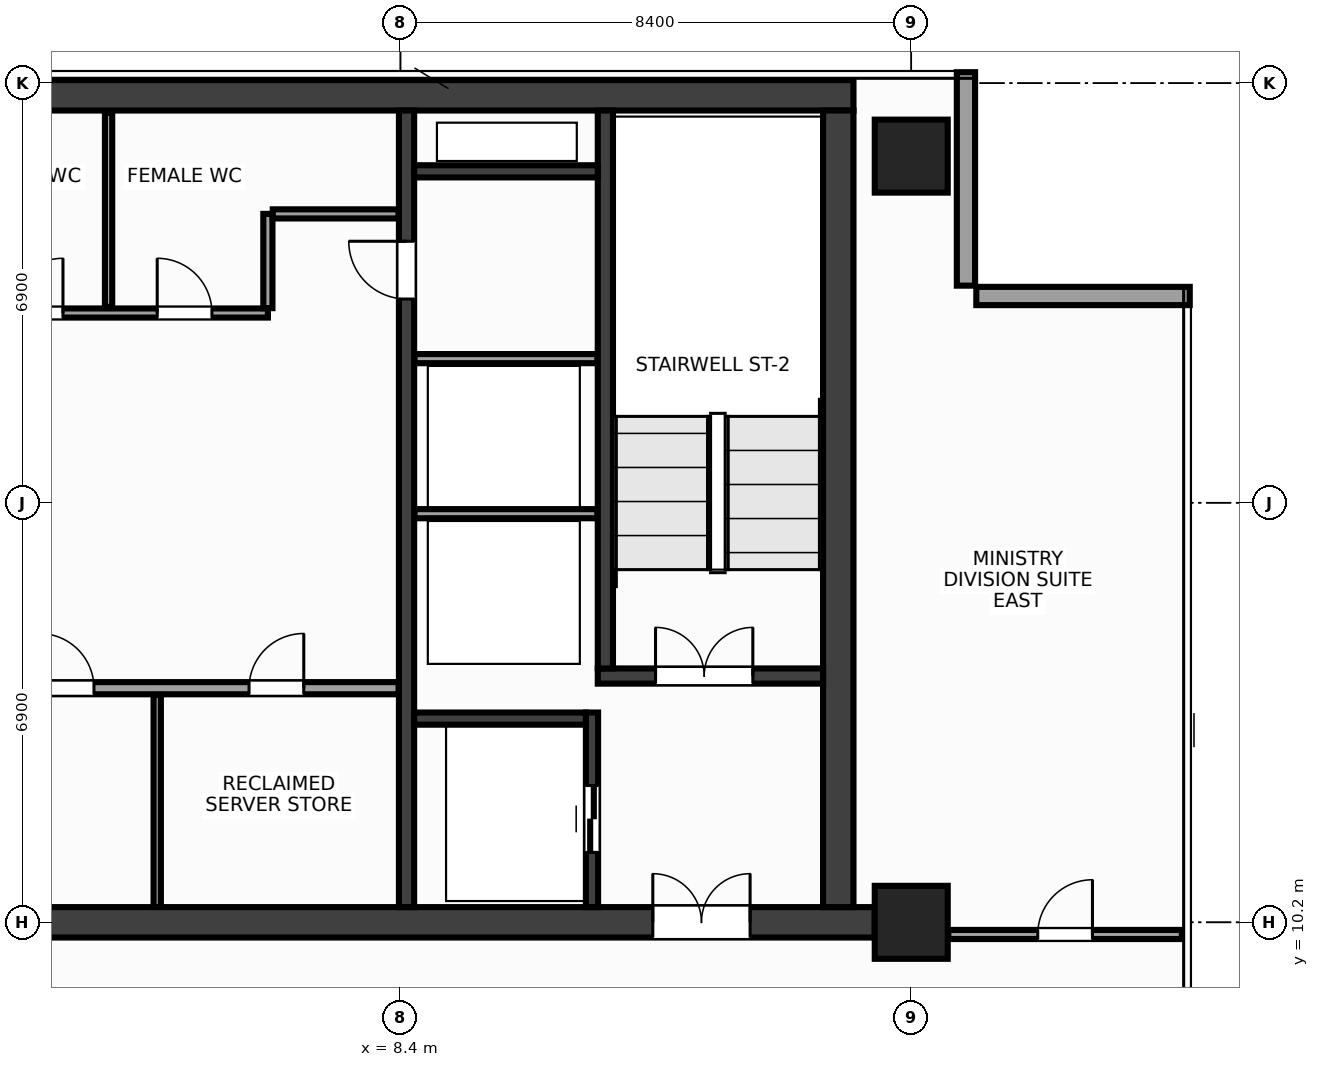
"""IFC4 building model, lengths in metres.
Left out: names, types, materials, properties, quantities, classifications, styles, units other than length and angle.
Written with IfcOpenShell. Run it as: python <this file> out.ifc"""

import sys

from ifc_helpers import new_model, si_unit, direction, frame, frame_2d, origin, origin_2d, place, context, subcontext, project, spatial, rectangle, extrude, source, transform, mapped, element, fill, save


model = new_model("IFC4")
c1 = context("Model", 3, precision=1e-05, world=origin(), true_north=direction((0.0, 1.0)))
c2 = subcontext(c1, "Body", "Model", "MODEL_VIEW")
j1 = project(units=[si_unit("LENGTHUNIT", "METRE"), si_unit("PLANEANGLEUNIT", "RADIAN")], contexts=[c1])
p1 = place(None, origin())
s1 = spatial("IfcSite", under=j1, at=p1, CompositionType="ELEMENT")
p2 = place(p1, origin())
s2 = spatial("IfcBuilding", under=s1, at=p2, CompositionType="ELEMENT")
p3 = place(p2, frame((0.0, 0.0, 279.2)))
s3 = spatial("IfcBuildingStorey", under=s2, at=p3, CompositionType="ELEMENT", Elevation=279.2)
m1 = source(origin(), c2, "Body", "SweptSolid", [
    extrude(rectangle(XDim=31.7, YDim=0.5, at=frame_2d((15.85, 0.0))), origin(), (0.0, 0.0, 1.0), 3.6),
])
p4 = place(p3, frame((-15.85, 23.8, 0.0), z_axis=(0.0, 0.0, 1.0), x_axis=(1.0, 0.0, 0.0)))
e1 = element("IfcWall", 1, at=p4, inside=s3, PredefinedType="SHEAR", context=c2, shape_type="MappedRepresentation", body=[
    mapped(m1, transform((0.0, 0.0, 0.0), x_axis=(1.0, 0.0, 0.0), y_axis=(0.0, 1.0, 0.0), z_axis=(0.0, 0.0, 1.0), scale=1.0)),
])
m2 = source(origin(), c2, "Body", "SweptSolid", [
    extrude(rectangle(XDim=32.4, YDim=0.5, at=frame_2d((16.2, 0.0))), origin(), (0.0, 0.0, 1.0), 3.6),
])
p5 = place(p3, frame((-16.2, 10.2, 0.0), z_axis=(0.0, 0.0, 1.0), x_axis=(1.0, 0.0, 0.0)))
e2 = element("IfcWall", 2, at=p5, inside=s3, PredefinedType="SHEAR", context=c2, shape_type="MappedRepresentation", body=[
    mapped(m2, transform((0.0, 0.0, 0.0), x_axis=(1.0, 0.0, 0.0), y_axis=(0.0, 1.0, 0.0), z_axis=(0.0, 0.0, 1.0), scale=1.0)),
])
p6 = place(p5, frame((2.05, 0.0, 0.0)))
e3 = element("IfcOpeningElement", 3, at=p6, cuts=e2, PredefinedType="OPENING", context=c2, shape_type="SweptSolid", body=[
    extrude(rectangle(XDim=1.6, YDim=2.15, at=frame_2d((0.8, 1.075))), frame((0.0, 0.262, 0.0), z_axis=(0.0, -1.0, 0.0), x_axis=(1.0, 0.0, 0.0)), (0.0, 0.0, 1.0), 0.524),
])
p7 = place(p5, frame((28.75, 0.0, 0.0)))
e4 = element("IfcOpeningElement", 4, at=p7, cuts=e2, PredefinedType="OPENING", context=c2, shape_type="SweptSolid", body=[
    extrude(rectangle(XDim=1.6, YDim=2.15, at=frame_2d((0.8, 1.075))), frame((0.0, 0.262, 0.0), z_axis=(0.0, -1.0, 0.0), x_axis=(1.0, 0.0, 0.0)), (0.0, 0.0, 1.0), 0.524),
])
p8 = place(p5, frame((15.45, 0.0, 0.0)))
e5 = element("IfcOpeningElement", 5, at=p8, cuts=e2, PredefinedType="OPENING", context=c2, shape_type="SweptSolid", body=[
    extrude(rectangle(XDim=1.5, YDim=2.2, at=frame_2d((0.75, 1.1))), frame((0.0, 0.262, 0.0), z_axis=(0.0, -1.0, 0.0), x_axis=(1.0, 0.0, 0.0)), (0.0, 0.0, 1.0), 0.524),
])
m3 = source(origin(), c2, "Body", "SweptSolid", [
    extrude(rectangle(XDim=13.1, YDim=0.5, at=frame_2d((6.55, 0.0))), origin(), (0.0, 0.0, 1.0), 3.6),
])
p9 = place(p3, frame((15.6, 10.45, 0.0), z_axis=(0.0, 0.0, 1.0), x_axis=(0.0, 1.0, 0.0)))
e6 = element("IfcWall", 6, at=p9, inside=s3, PredefinedType="SHEAR", context=c2, shape_type="MappedRepresentation", body=[
    mapped(m3, transform((0.0, 0.0, 0.0), x_axis=(1.0, 0.0, 0.0), y_axis=(0.0, 1.0, 0.0), z_axis=(0.0, 0.0, 1.0), scale=1.0)),
])
m4 = source(origin(), c2, "Body", "SweptSolid", [
    extrude(rectangle(XDim=13.1, YDim=0.25, at=frame_2d((6.55, 0.0))), origin(), (0.0, 0.0, 1.0), 3.6),
])
p10 = place(p3, frame((8.5, 10.45, 0.0), z_axis=(0.0, 0.0, 1.0), x_axis=(0.0, 1.0, 0.0)))
e7 = element("IfcWall", 7, at=p10, inside=s3, PredefinedType="SHEAR", context=c2, shape_type="MappedRepresentation", body=[
    mapped(m4, transform((0.0, 0.0, 0.0), x_axis=(1.0, 0.0, 0.0), y_axis=(0.0, 1.0, 0.0), z_axis=(0.0, 0.0, 1.0), scale=1.0)),
])
p11 = place(p10, frame((10.0, 0.0, 0.0)))
e8 = element("IfcOpeningElement", 8, at=p11, cuts=e7, PredefinedType="OPENING", context=c2, shape_type="SweptSolid", body=[
    extrude(rectangle(XDim=0.95, YDim=2.15, at=frame_2d((0.475, 1.075))), frame((0.0, 0.137, 0.0), z_axis=(0.0, -1.0, 0.0), x_axis=(1.0, 0.0, 0.0)), (0.0, 0.0, 1.0), 0.274),
])
m5 = source(origin(), c2, "Body", "SweptSolid", [
    extrude(rectangle(XDim=3.705, YDim=0.25, at=frame_2d((1.853, 0.0))), origin(), (0.0, 0.0, 1.0), 3.6),
])
p12 = place(p3, frame((11.645, 14.25, 0.0), z_axis=(0.0, 0.0, 1.0), x_axis=(1.0, 0.0, 0.0)))
e9 = element("IfcWall", 9, at=p12, inside=s3, PredefinedType="SHEAR", context=c2, shape_type="MappedRepresentation", body=[
    mapped(m5, transform((0.0, 0.0, 0.0), x_axis=(1.0, 0.0, 0.0), y_axis=(0.0, 1.0, 0.0), z_axis=(0.0, 0.0, 1.0), scale=1.0)),
])
p13 = place(p12, frame((0.95, 0.0, 0.0)))
e10 = element("IfcOpeningElement", 10, at=p13, cuts=e9, PredefinedType="OPENING", context=c2, shape_type="SweptSolid", body=[
    extrude(rectangle(XDim=1.6, YDim=2.15, at=frame_2d((0.8, 1.075))), frame((0.0, 0.137, 0.0), z_axis=(0.0, -1.0, 0.0), x_axis=(1.0, 0.0, 0.0)), (0.0, 0.0, 1.0), 0.274),
])
m6 = source(origin(), c2, "Body", "SweptSolid", [
    extrude(rectangle(XDim=9.175, YDim=0.25, at=frame_2d((4.587, 0.0))), origin(), (0.0, 0.0, 1.0), 3.6),
])
p14 = place(p3, frame((11.77, 14.375, 0.0), z_axis=(0.0, 0.0, 1.0), x_axis=(0.0, 1.0, 0.0)))
e11 = element("IfcWall", 11, at=p14, inside=s3, PredefinedType="SHEAR", context=c2, shape_type="MappedRepresentation", body=[
    mapped(m6, transform((0.0, 0.0, 0.0), x_axis=(1.0, 0.0, 0.0), y_axis=(0.0, 1.0, 0.0), z_axis=(0.0, 0.0, 1.0), scale=1.0)),
])
m7 = source(origin(), c2, "Body", "SweptSolid", [
    extrude(rectangle(XDim=3.2, YDim=0.2, at=frame_2d((1.6, 0.0))), origin(), (0.0, 0.0, 1.0), 3.6),
])
p15 = place(p3, frame((11.55, 10.45, 0.0), z_axis=(0.0, 0.0, 1.0), x_axis=(0.0, 1.0, 0.0)))
e12 = element("IfcWall", 12, at=p15, inside=s3, PredefinedType="SHEAR", context=c2, shape_type="MappedRepresentation", body=[
    mapped(m7, transform((0.0, 0.0, 0.0), x_axis=(1.0, 0.0, 0.0), y_axis=(0.0, 1.0, 0.0), z_axis=(0.0, 0.0, 1.0), scale=1.0)),
])
p16 = place(p15, frame((0.9, 0.0, 0.0)))
e13 = element("IfcOpeningElement", 13, at=p16, cuts=e12, PredefinedType="OPENING", context=c2, shape_type="SweptSolid", body=[
    extrude(rectangle(XDim=1.1, YDim=2.15, at=frame_2d((0.55, 1.075))), frame((0.0, 0.112, 0.0), z_axis=(0.0, -1.0, 0.0), x_axis=(1.0, 0.0, 0.0)), (0.0, 0.0, 1.0), 0.224),
])
m8 = source(origin(), c2, "Body", "SweptSolid", [
    extrude(rectangle(XDim=2.825, YDim=0.2, at=frame_2d((1.413, 0.0))), origin(), (0.0, 0.0, 1.0), 3.6),
])
p17 = place(p3, frame((8.625, 13.55, 0.0), z_axis=(0.0, 0.0, 1.0), x_axis=(1.0, 0.0, 0.0)))
e14 = element("IfcWall", 14, at=p17, inside=s3, PredefinedType="SHEAR", context=c2, shape_type="MappedRepresentation", body=[
    mapped(m8, transform((0.0, 0.0, 0.0), x_axis=(1.0, 0.0, 0.0), y_axis=(0.0, 1.0, 0.0), z_axis=(0.0, 0.0, 1.0), scale=1.0)),
])
m9 = source(origin(), c2, "Body", "SweptSolid", [
    extrude(rectangle(XDim=3.02, YDim=0.2, at=frame_2d((1.51, 0.0))), origin(), (0.0, 0.0, 1.0), 3.6),
])
p18 = place(p3, frame((8.625, 22.55, 0.0), z_axis=(0.0, 0.0, 1.0), x_axis=(1.0, 0.0, 0.0)))
e15 = element("IfcWall", 15, at=p18, inside=s3, PredefinedType="SHEAR", context=c2, shape_type="MappedRepresentation", body=[
    mapped(m9, transform((0.0, 0.0, 0.0), x_axis=(1.0, 0.0, 0.0), y_axis=(0.0, 1.0, 0.0), z_axis=(0.0, 0.0, 1.0), scale=1.0)),
])
m10 = source(origin(), c2, "Body", "SweptSolid", [
    extrude(rectangle(XDim=1.2, YDim=1.2, at=origin_2d()), origin(), (0.0, 0.0, 1.0), 3.6),
])
for number, where, z_axis, x_axis in (
    (16, (16.8, 10.2, 0.0), (0.0, 0.0, 1.0), (1.0, 0.0, 0.0)),
    (17, (16.8, 22.8, 0.0), (0.0, 0.0, 1.0), (1.0, 0.0, 0.0)),
):
    element("IfcColumn", number, at=place(p3, frame(where, z_axis=z_axis, x_axis=x_axis)), inside=s3, PredefinedType="COLUMN", context=c2, shape_type="MappedRepresentation", body=[
        mapped(m10, transform((0.0, 0.0, 0.0), x_axis=(1.0, 0.0, 0.0), y_axis=(0.0, 1.0, 0.0), z_axis=(0.0, 0.0, 1.0), scale=1.0)),
    ])
m11 = source(origin(), c2, "Body", "SweptSolid", [
    extrude(rectangle(XDim=3.51, YDim=0.3, at=frame_2d((1.755, 0.0))), origin(), (0.0, 0.0, 1.0), 2.75),
])
p19 = place(p3, frame((21.38, 20.5, 0.0), z_axis=(0.0, 0.0, 1.0), x_axis=(-1.0, 0.0, 0.0)))
e18 = element("IfcWall", 18, at=p19, inside=s3, PredefinedType="STANDARD", context=c2, shape_type="MappedRepresentation", body=[
    mapped(m11, transform((0.0, 0.0, 0.0), x_axis=(1.0, 0.0, 0.0), y_axis=(0.0, 1.0, 0.0), z_axis=(0.0, 0.0, 1.0), scale=1.0)),
])
m12 = source(origin(), c2, "Body", "SweptSolid", [
    extrude(rectangle(XDim=3.51, YDim=0.3, at=frame_2d((1.755, 0.0))), origin(), (0.0, 0.0, 1.0), 2.75),
])
p20 = place(p3, frame((17.7, 20.67, 0.0), z_axis=(0.0, 0.0, 1.0), x_axis=(0.0, 1.0, 0.0)))
e19 = element("IfcWall", 19, at=p20, inside=s3, PredefinedType="STANDARD", context=c2, shape_type="MappedRepresentation", body=[
    mapped(m12, transform((0.0, 0.0, 0.0), x_axis=(1.0, 0.0, 0.0), y_axis=(0.0, 1.0, 0.0), z_axis=(0.0, 0.0, 1.0), scale=1.0)),
])
m13 = source(origin(), c2, "Body", "SweptSolid", [
    extrude(rectangle(XDim=3.01, YDim=0.15, at=frame_2d((1.505, 0.0))), origin(), (0.0, 0.0, 1.0), 3.37),
])
for number, where, z_axis, x_axis in (
    (20, (8.63, 16.92, 0.0), (0.0, 0.0, 1.0), (1.0, 0.0, 0.0)),
    (21, (8.63, 19.47, 0.0), (0.0, 0.0, 1.0), (1.0, 0.0, 0.0)),
):
    element("IfcWall", number, at=place(p3, frame(where, z_axis=z_axis, x_axis=x_axis)), inside=s3, PredefinedType="PARTITIONING", context=c2, shape_type="MappedRepresentation", body=[
        mapped(m13, transform((0.0, 0.0, 0.0), x_axis=(1.0, 0.0, 0.0), y_axis=(0.0, 1.0, 0.0), z_axis=(0.0, 0.0, 1.0), scale=1.0)),
    ])
m14 = source(origin(), c2, "Body", "SweptSolid", [
    extrude(rectangle(XDim=7.07, YDim=0.2, at=frame_2d((3.535, 0.0))), origin(), (0.0, 0.0, 1.0), 3.37),
])
p21 = place(p3, frame((1.3, 14.05, 0.0), z_axis=(0.0, 0.0, 1.0), x_axis=(1.0, 0.0, 0.0)))
e22 = element("IfcWall", 22, at=p21, inside=s3, PredefinedType="PARTITIONING", context=c2, shape_type="MappedRepresentation", body=[
    mapped(m14, transform((0.0, 0.0, 0.0), x_axis=(1.0, 0.0, 0.0), y_axis=(0.0, 1.0, 0.0), z_axis=(0.0, 0.0, 1.0), scale=1.0)),
])
p22 = place(p21, frame((1.16, 0.0, 0.0)))
e23 = element("IfcOpeningElement", 23, at=p22, cuts=e22, PredefinedType="OPENING", context=c2, shape_type="SweptSolid", body=[
    extrude(rectangle(XDim=0.9, YDim=2.15, at=frame_2d((0.45, 1.075))), frame((0.0, 0.112, 0.0), z_axis=(0.0, -1.0, 0.0), x_axis=(1.0, 0.0, 0.0)), (0.0, 0.0, 1.0), 0.224),
])
p23 = place(p21, frame((4.61, 0.0, 0.0)))
e24 = element("IfcOpeningElement", 24, at=p23, cuts=e22, PredefinedType="OPENING", context=c2, shape_type="SweptSolid", body=[
    extrude(rectangle(XDim=0.9, YDim=2.15, at=frame_2d((0.45, 1.075))), frame((0.0, 0.112, 0.0), z_axis=(0.0, -1.0, 0.0), x_axis=(1.0, 0.0, 0.0)), (0.0, 0.0, 1.0), 0.224),
])
m15 = source(origin(), c2, "Body", "SweptSolid", [
    extrude(rectangle(XDim=14.59, YDim=0.15, at=frame_2d((7.295, 0.0))), origin(), (0.0, 0.0, 1.0), 3.37),
])
p24 = place(p3, frame((-8.37, 20.22, 0.0), z_axis=(0.0, 0.0, 1.0), x_axis=(1.0, 0.0, 0.0)))
e25 = element("IfcWall", 25, at=p24, inside=s3, PredefinedType="PARTITIONING", context=c2, shape_type="MappedRepresentation", body=[
    mapped(m15, transform((0.0, 0.0, 0.0), x_axis=(1.0, 0.0, 0.0), y_axis=(0.0, 1.0, 0.0), z_axis=(0.0, 0.0, 1.0), scale=1.0)),
])
p25 = place(p24, frame((4.36, 0.0, 0.0)))
e26 = element("IfcOpeningElement", 26, at=p25, cuts=e25, PredefinedType="OPENING", context=c2, shape_type="SweptSolid", body=[
    extrude(rectangle(XDim=0.9, YDim=2.15, at=frame_2d((0.45, 1.075))), frame((0.0, 0.087, 0.0), z_axis=(0.0, -1.0, 0.0), x_axis=(1.0, 0.0, 0.0)), (0.0, 0.0, 1.0), 0.174),
])
p26 = place(p24, frame((10.32, 0.0, 0.0)))
e27 = element("IfcOpeningElement", 27, at=p26, cuts=e25, PredefinedType="OPENING", context=c2, shape_type="SweptSolid", body=[
    extrude(rectangle(XDim=0.9, YDim=2.15, at=frame_2d((0.45, 1.075))), frame((0.0, 0.087, 0.0), z_axis=(0.0, -1.0, 0.0), x_axis=(1.0, 0.0, 0.0)), (0.0, 0.0, 1.0), 0.174),
])
p27 = place(p24, frame((12.77, 0.0, 0.0)))
e28 = element("IfcOpeningElement", 28, at=p27, cuts=e25, PredefinedType="OPENING", context=c2, shape_type="SweptSolid", body=[
    extrude(rectangle(XDim=0.9, YDim=2.15, at=frame_2d((0.45, 1.075))), frame((0.0, 0.087, 0.0), z_axis=(0.0, -1.0, 0.0), x_axis=(1.0, 0.0, 0.0)), (0.0, 0.0, 1.0), 0.174),
])
m16 = source(origin(), c2, "Body", "SweptSolid", [
    extrude(rectangle(XDim=1.55, YDim=0.15, at=frame_2d((0.775, 0.0))), origin(), (0.0, 0.0, 1.0), 3.37),
])
p28 = place(p3, frame((6.22, 20.3, 0.0), z_axis=(0.0, 0.0, 1.0), x_axis=(0.0, 1.0, 0.0)))
e29 = element("IfcWall", 29, at=p28, inside=s3, PredefinedType="PARTITIONING", context=c2, shape_type="MappedRepresentation", body=[
    mapped(m16, transform((0.0, 0.0, 0.0), x_axis=(1.0, 0.0, 0.0), y_axis=(0.0, 1.0, 0.0), z_axis=(0.0, 0.0, 1.0), scale=1.0)),
])
m17 = source(origin(), c2, "Body", "SweptSolid", [
    extrude(rectangle(XDim=2.07, YDim=0.15, at=frame_2d((1.035, 0.0))), origin(), (0.0, 0.0, 1.0), 3.37),
])
p29 = place(p3, frame((6.3, 21.85, 0.0), z_axis=(0.0, 0.0, 1.0), x_axis=(1.0, 0.0, 0.0)))
e30 = element("IfcWall", 30, at=p29, inside=s3, PredefinedType="PARTITIONING", context=c2, shape_type="MappedRepresentation", body=[
    mapped(m17, transform((0.0, 0.0, 0.0), x_axis=(1.0, 0.0, 0.0), y_axis=(0.0, 1.0, 0.0), z_axis=(0.0, 0.0, 1.0), scale=1.0)),
])
m18 = source(origin(), c2, "Body", "SweptSolid", [
    extrude(rectangle(XDim=3.49, YDim=0.12, at=frame_2d((1.745, 0.0))), origin(), (0.0, 0.0, 1.0), 3.37),
])
p30 = place(p3, frame((4.4, 10.45, 0.0), z_axis=(0.0, 0.0, 1.0), x_axis=(0.0, 1.0, 0.0)))
e31 = element("IfcWall", 31, at=p30, inside=s3, PredefinedType="PARTITIONING", context=c2, shape_type="MappedRepresentation", body=[
    mapped(m18, transform((0.0, 0.0, 0.0), x_axis=(1.0, 0.0, 0.0), y_axis=(0.0, 1.0, 0.0), z_axis=(0.0, 0.0, 1.0), scale=1.0)),
])
m19 = source(origin(), c2, "Body", "SweptSolid", [
    extrude(rectangle(XDim=3.19, YDim=0.12, at=frame_2d((1.595, 0.0))), origin(), (0.0, 0.0, 1.0), 3.37),
])
p31 = place(p3, frame((3.6, 20.32, 0.0), z_axis=(0.0, 0.0, 1.0), x_axis=(0.0, 1.0, 0.0)))
e32 = element("IfcWall", 32, at=p31, inside=s3, PredefinedType="PARTITIONING", context=c2, shape_type="MappedRepresentation", body=[
    mapped(m19, transform((0.0, 0.0, 0.0), x_axis=(1.0, 0.0, 0.0), y_axis=(0.0, 1.0, 0.0), z_axis=(0.0, 0.0, 1.0), scale=1.0)),
])
m20 = source(origin(), c2, "Body", "SweptSolid", [
    extrude(rectangle(XDim=3.84, YDim=0.15, at=frame_2d((1.92, 0.0))), origin(), (0.0, 0.0, 1.0), 2.805),
])
p32 = place(p3, frame((17.41, 10.0, 0.0), z_axis=(0.0, 0.0, 1.0), x_axis=(1.0, 0.0, 0.0)))
e33 = element("IfcWall", 33, at=p32, inside=s3, PredefinedType="PARTITIONING", context=c2, shape_type="MappedRepresentation", body=[
    mapped(m20, transform((0.0, 0.0, 0.0), x_axis=(1.0, 0.0, 0.0), y_axis=(0.0, 1.0, 0.0), z_axis=(0.0, 0.0, 1.0), scale=1.0)),
])
p33 = place(p32, frame((1.47, 0.0, 0.0)))
e34 = element("IfcOpeningElement", 34, at=p33, cuts=e33, PredefinedType="OPENING", context=c2, shape_type="SweptSolid", body=[
    extrude(rectangle(XDim=0.9, YDim=2.15, at=frame_2d((0.45, 1.075))), frame((0.0, 0.087, 0.0), z_axis=(0.0, -1.0, 0.0), x_axis=(1.0, 0.0, 0.0)), (0.0, 0.0, 1.0), 0.174),
])
m21 = source(origin(), c2, "Body", "SweptSolid", [
    extrude(rectangle(XDim=1.6, YDim=2.15, at=frame_2d((0.8, 1.075))), frame((0.0, 0.025, 0.0), z_axis=(0.0, -1.0, 0.0), x_axis=(1.0, 0.0, 0.0)), (0.0, 0.0, 1.0), 0.05),
])
p34 = place(p13, origin())
e35 = element("IfcDoor", 35, at=p34, inside=s3, OperationType="DOUBLE_DOOR_SINGLE_SWING", PredefinedType="DOOR", context=c2, shape_type="MappedRepresentation", body=[
    mapped(m21, transform((0.0, 0.0, 0.0), x_axis=(1.0, 0.0, 0.0), y_axis=(0.0, 1.0, 0.0), z_axis=(0.0, 0.0, 1.0), scale=1.0)),
])
fill(e10, e35)
p35 = place(p7, origin())
e36 = element("IfcDoor", 36, at=p35, inside=s3, OperationType="DOUBLE_DOOR_SINGLE_SWING", PredefinedType="DOOR", context=c2, shape_type="MappedRepresentation", body=[
    mapped(m21, transform((0.0, 0.0, 0.0), x_axis=(1.0, 0.0, 0.0), y_axis=(0.0, 1.0, 0.0), z_axis=(0.0, 0.0, 1.0), scale=1.0)),
])
fill(e4, e36)
m22 = source(origin(), c2, "Body", "SweptSolid", [
    extrude(rectangle(XDim=1.1, YDim=2.15, at=frame_2d((0.55, 1.075))), frame((0.0, 0.025, 0.0), z_axis=(0.0, -1.0, 0.0), x_axis=(1.0, 0.0, 0.0)), (0.0, 0.0, 1.0), 0.05),
])
p36 = place(p16, origin())
e37 = element("IfcDoor", 37, at=p36, inside=s3, OperationType="DOUBLE_DOOR_SLIDING", PredefinedType="DOOR", context=c2, shape_type="MappedRepresentation", body=[
    mapped(m22, transform((0.0, 0.0, 0.0), x_axis=(1.0, 0.0, 0.0), y_axis=(0.0, 1.0, 0.0), z_axis=(0.0, 0.0, 1.0), scale=1.0)),
])
fill(e13, e37)
m23 = source(origin(), c2, "Body", "SweptSolid", [
    extrude(rectangle(XDim=0.95, YDim=2.15, at=frame_2d((0.475, 1.075))), frame((0.0, 0.025, 0.0), z_axis=(0.0, -1.0, 0.0), x_axis=(1.0, 0.0, 0.0)), (0.0, 0.0, 1.0), 0.05),
])
p37 = place(p11, origin())
e38 = element("IfcDoor", 38, at=p37, inside=s3, OperationType="SINGLE_SWING_RIGHT", PredefinedType="DOOR", context=c2, shape_type="MappedRepresentation", body=[
    mapped(m23, transform((0.0, 0.0, 0.0), x_axis=(1.0, 0.0, 0.0), y_axis=(0.0, 1.0, 0.0), z_axis=(0.0, 0.0, 1.0), scale=1.0)),
])
fill(e8, e38)
m24 = source(origin(), c2, "Body", "SweptSolid", [
    extrude(rectangle(XDim=0.9, YDim=2.15, at=frame_2d((0.45, 1.075))), frame((0.0, 0.025, 0.0), z_axis=(0.0, -1.0, 0.0), x_axis=(1.0, 0.0, 0.0)), (0.0, 0.0, 1.0), 0.05),
])
p38 = place(p22, origin())
e39 = element("IfcDoor", 39, at=p38, inside=s3, OperationType="SINGLE_SWING_LEFT", PredefinedType="DOOR", context=c2, shape_type="MappedRepresentation", body=[
    mapped(m24, transform((0.0, 0.0, 0.0), x_axis=(1.0, 0.0, 0.0), y_axis=(0.0, 1.0, 0.0), z_axis=(0.0, 0.0, 1.0), scale=1.0)),
])
fill(e23, e39)
p39 = place(p23, origin())
e40 = element("IfcDoor", 40, at=p39, inside=s3, OperationType="SINGLE_SWING_RIGHT", PredefinedType="DOOR", context=c2, shape_type="MappedRepresentation", body=[
    mapped(m24, transform((0.0, 0.0, 0.0), x_axis=(1.0, 0.0, 0.0), y_axis=(0.0, 1.0, 0.0), z_axis=(0.0, 0.0, 1.0), scale=1.0)),
])
fill(e24, e40)
p40 = place(p26, origin())
e41 = element("IfcDoor", 41, at=p40, inside=s3, OperationType="SINGLE_SWING_RIGHT", PredefinedType="DOOR", context=c2, shape_type="MappedRepresentation", body=[
    mapped(m24, transform((0.0, 0.0, 0.0), x_axis=(1.0, 0.0, 0.0), y_axis=(0.0, 1.0, 0.0), z_axis=(0.0, 0.0, 1.0), scale=1.0)),
])
fill(e27, e41)
p41 = place(p27, origin())
e42 = element("IfcDoor", 42, at=p41, inside=s3, OperationType="SINGLE_SWING_LEFT", PredefinedType="DOOR", context=c2, shape_type="MappedRepresentation", body=[
    mapped(m24, transform((0.0, 0.0, 0.0), x_axis=(1.0, 0.0, 0.0), y_axis=(0.0, 1.0, 0.0), z_axis=(0.0, 0.0, 1.0), scale=1.0)),
])
fill(e28, e42)
p42 = place(p33, origin())
e43 = element("IfcDoor", 43, at=p42, inside=s3, OperationType="SINGLE_SWING_RIGHT", PredefinedType="DOOR", context=c2, shape_type="MappedRepresentation", body=[
    mapped(m24, transform((0.0, 0.0, 0.0), x_axis=(1.0, 0.0, 0.0), y_axis=(0.0, 1.0, 0.0), z_axis=(0.0, 0.0, 1.0), scale=1.0)),
])
fill(e34, e43)
save(model, sys.argv[1])
